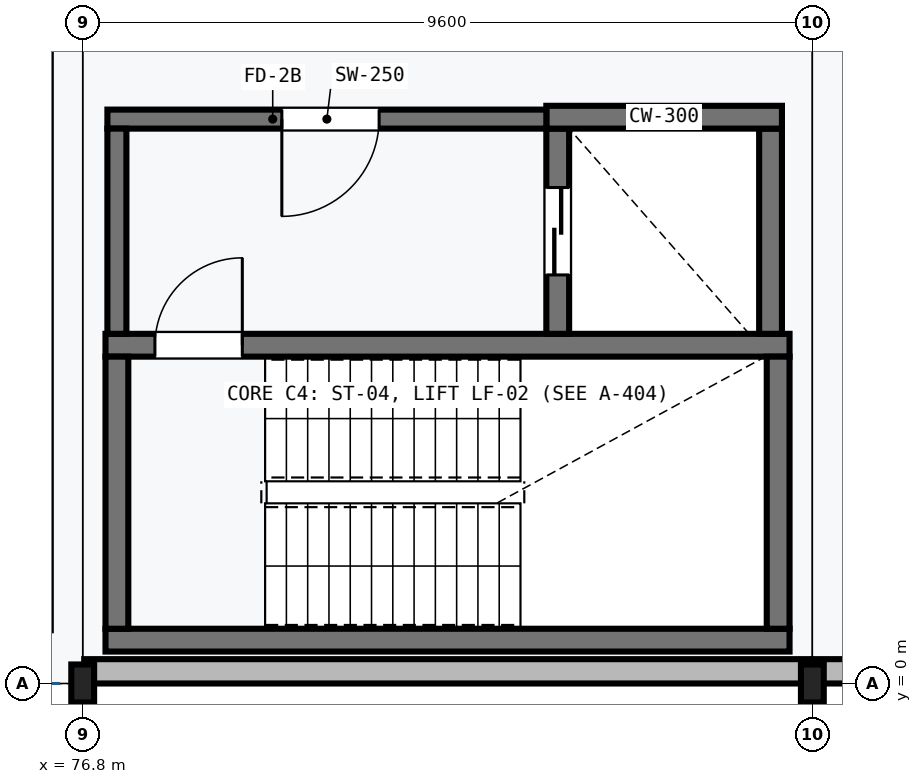
"""IFC4 building model, lengths in metres.
Left out: names, types, materials, properties, quantities, classifications, styles, units other than length and angle.
Written with IfcOpenShell. Run it as: python <this file> out.ifc"""

import sys

from ifc_helpers import new_model, si_unit, direction, frame, frame_2d, origin, origin_2d, place, context, subcontext, project, spatial, rectangle, i_section, extrude, element, fill, save


model = new_model("IFC4")
c1 = context("Model", 3, precision=1e-05, world=origin(), true_north=direction((0.0, 1.0)))
c2 = subcontext(c1, "Body", "Model", "MODEL_VIEW")
j1 = project(units=[si_unit("LENGTHUNIT", "METRE"), si_unit("PLANEANGLEUNIT", "RADIAN")], contexts=[c1])
p1 = place(None, origin())
s1 = spatial("IfcSite", under=j1, at=p1, CompositionType="ELEMENT")
p2 = place(p1, origin())
s2 = spatial("IfcBuilding", under=s1, at=p2, CompositionType="ELEMENT")
p3 = place(p2, frame((0.0, 0.0, 6.0)))
s3 = spatial("IfcBuildingStorey", under=s2, at=p3, CompositionType="ELEMENT", Elevation=6.0)
for number, where, z_axis, x_axis in (
    (1, (76.8, 0.0, 0.0), (0.0, 0.0, 1.0), (1.0, 0.0, 0.0)),
    (2, (86.4, 0.0, 0.0), (0.0, 0.0, 1.0), (1.0, 0.0, 0.0)),
):
    element("IfcColumn", number, at=place(p3, frame(where, z_axis=z_axis, x_axis=x_axis)), inside=s3, PredefinedType="COLUMN", context=c2, shape_type="SweptSolid", body=[
        extrude(i_section(OverallWidth=0.3, OverallDepth=0.5, WebThickness=0.014, FlangeThickness=0.028, FilletRadius=0.027, at=origin_2d()), origin(), (0.0, 0.0, 1.0), 4.25),
    ])
p4 = place(p3, frame((77.1, 0.57, 0.0), z_axis=(0.0, 0.0, 1.0), x_axis=(1.0, 0.0, 0.0)))
e3 = element("IfcWall", 3, at=p4, inside=s3, PredefinedType="SHEAR", context=c2, shape_type="SweptSolid", body=[
    extrude(rectangle(XDim=9.0, YDim=0.3, at=frame_2d((4.5, 0.0))), origin(), (0.0, 0.0, 1.0), 4.25),
])
p5 = place(p3, frame((86.1, 4.45, 0.0), z_axis=(0.0, 0.0, 1.0), x_axis=(-1.0, 0.0, 0.0)))
e4 = element("IfcWall", 4, at=p5, inside=s3, PredefinedType="SHEAR", context=c2, shape_type="SweptSolid", body=[
    extrude(rectangle(XDim=9.0, YDim=0.3, at=frame_2d((4.5, 0.0))), origin(), (0.0, 0.0, 1.0), 4.25),
])
p6 = place(p5, frame((7.2, 0.0, 0.0)))
e5 = element("IfcOpeningElement", 5, at=p6, cuts=e4, PredefinedType="OPENING", context=c2, shape_type="SweptSolid", body=[
    extrude(rectangle(XDim=1.15, YDim=2.15, at=frame_2d((0.575, 1.075))), frame((0.0, 0.16, 0.0), z_axis=(0.0, -1.0, 0.0), x_axis=(1.0, 0.0, 0.0)), (0.0, 0.0, 1.0), 0.32),
])
for number, where, z_axis, x_axis in (
    (6, (77.25, 0.72, 0.0), (0.0, 0.0, 1.0), (0.0, 1.0, 0.0)),
    (7, (85.95, 4.3, 0.0), (0.0, 0.0, 1.0), (0.0, -1.0, 0.0)),
):
    element("IfcWall", number, at=place(p3, frame(where, z_axis=z_axis, x_axis=x_axis)), inside=s3, PredefinedType="SHEAR", context=c2, shape_type="SweptSolid", body=[
        extrude(rectangle(XDim=3.58, YDim=0.3, at=frame_2d((1.79, 0.0))), origin(), (0.0, 0.0, 1.0), 4.25),
    ])
p7 = place(p3, frame((83.05, 7.3, 0.0), z_axis=(0.0, 0.0, 1.0), x_axis=(0.0, -1.0, 0.0)))
e8 = element("IfcWall", 8, at=p7, inside=s3, PredefinedType="SHEAR", context=c2, shape_type="SweptSolid", body=[
    extrude(rectangle(XDim=2.7, YDim=0.3, at=frame_2d((1.35, 0.0))), origin(), (0.0, 0.0, 1.0), 4.25),
])
p8 = place(p7, frame((0.775, 0.0, 0.0)))
e9 = element("IfcOpeningElement", 9, at=p8, cuts=e8, PredefinedType="OPENING", context=c2, shape_type="SweptSolid", body=[
    extrude(rectangle(XDim=1.15, YDim=2.1, at=frame_2d((0.575, 1.05))), frame((0.0, 0.16, 0.0), z_axis=(0.0, -1.0, 0.0), x_axis=(1.0, 0.0, 0.0)), (0.0, 0.0, 1.0), 0.32),
])
p9 = place(p3, frame((85.85, 4.6, 0.0), z_axis=(0.0, 0.0, 1.0), x_axis=(0.0, 1.0, 0.0)))
e10 = element("IfcWall", 10, at=p9, inside=s3, PredefinedType="SHEAR", context=c2, shape_type="SweptSolid", body=[
    extrude(rectangle(XDim=2.7, YDim=0.3, at=frame_2d((1.35, 0.0))), origin(), (0.0, 0.0, 1.0), 4.25),
])
p10 = place(p3, frame((82.9, 7.45, 0.0), z_axis=(0.0, 0.0, 1.0), x_axis=(1.0, 0.0, 0.0)))
e11 = element("IfcWall", 11, at=p10, inside=s3, PredefinedType="SHEAR", context=c2, shape_type="SweptSolid", body=[
    extrude(rectangle(XDim=3.1, YDim=0.3, at=frame_2d((1.55, 0.0))), origin(), (0.0, 0.0, 1.0), 4.25),
])
p11 = place(p3, frame((82.9, 7.425, 0.0), z_axis=(0.0, 0.0, 1.0), x_axis=(-1.0, 0.0, 0.0)))
e12 = element("IfcWall", 12, at=p11, inside=s3, PredefinedType="SHEAR", context=c2, shape_type="SweptSolid", body=[
    extrude(rectangle(XDim=5.775, YDim=0.25, at=frame_2d((2.887, 0.0))), origin(), (0.0, 0.0, 1.0), 4.25),
])
p12 = place(p11, frame((2.2, 0.0, 0.0)))
e13 = element("IfcOpeningElement", 13, at=p12, cuts=e12, PredefinedType="OPENING", context=c2, shape_type="SweptSolid", body=[
    extrude(rectangle(XDim=1.28, YDim=2.2, at=frame_2d((0.64, 1.1))), frame((0.0, 0.135, 0.0), z_axis=(0.0, -1.0, 0.0), x_axis=(1.0, 0.0, 0.0)), (0.0, 0.0, 1.0), 0.27),
])
p13 = place(p3, frame((77.25, 4.6, 0.0), z_axis=(0.0, 0.0, 1.0), x_axis=(0.0, 1.0, 0.0)))
e14 = element("IfcWall", 14, at=p13, inside=s3, PredefinedType="SHEAR", context=c2, shape_type="SweptSolid", body=[
    extrude(rectangle(XDim=2.7, YDim=0.25, at=frame_2d((1.35, 0.0))), origin(), (0.0, 0.0, 1.0), 4.25),
])
p14 = place(p3, frame((86.38, 0.16, 0.0), z_axis=(0.0, 0.0, 1.0), x_axis=(-1.0, 0.0, 0.0)))
e15 = element("IfcWall", 15, at=p14, inside=s3, PredefinedType="SOLIDWALL", context=c2, shape_type="SweptSolid", body=[
    extrude(rectangle(XDim=9.56, YDim=0.32, at=frame_2d((4.78, 0.0))), origin(), (0.0, 0.0, 1.0), 3.9),
])
p15 = place(p3, frame((95.98, 0.16, 0.0), z_axis=(0.0, 0.0, 1.0), x_axis=(-1.0, 0.0, 0.0)))
e16 = element("IfcWall", 16, at=p15, inside=s3, PredefinedType="SOLIDWALL", context=c2, shape_type="SweptSolid", body=[
    extrude(rectangle(XDim=9.56, YDim=0.32, at=frame_2d((4.78, 0.0))), origin(), (0.0, 0.0, 1.0), 3.9),
])
p16 = place(p15, frame((3.43, 0.0, 0.9)))
e17 = element("IfcOpeningElement", 17, at=p16, cuts=e16, PredefinedType="OPENING", context=c2, shape_type="SweptSolid", body=[
    extrude(rectangle(XDim=2.7, YDim=1.5, at=frame_2d((1.35, 0.75))), frame((0.0, 0.17, 0.0), z_axis=(0.0, -1.0, 0.0), x_axis=(1.0, 0.0, 0.0)), (0.0, 0.0, 1.0), 0.34),
])
p17 = place(p3, frame((76.31, 9.12, 0.0), z_axis=(0.0, 0.0, 1.0), x_axis=(0.0, -1.0, 0.0)))
e18 = element("IfcWall", 18, at=p17, inside=s3, PredefinedType="PARTITIONING", context=c2, shape_type="SweptSolid", body=[
    extrude(rectangle(XDim=8.44, YDim=0.18, at=frame_2d((4.22, 0.0))), origin(), (0.0, 0.0, 1.0), 3.89),
])
p18 = place(p6, frame((1.15, 0.0, 0.0), z_axis=(0.0, 0.0, 1.0), x_axis=(-1.0, 0.0, 0.0)))
e19 = element("IfcDoor", 19, at=p18, inside=s3, OperationType="SINGLE_SWING_LEFT", PredefinedType="DOOR", context=c2, shape_type="SweptSolid", body=[
    extrude(rectangle(XDim=1.15, YDim=2.15, at=frame_2d((0.575, 1.075))), frame((0.0, 0.025, 0.0), z_axis=(0.0, -1.0, 0.0), x_axis=(1.0, 0.0, 0.0)), (0.0, 0.0, 1.0), 0.05),
])
fill(e5, e19)
p19 = place(p8, frame((1.15, 0.0, 0.0), z_axis=(0.0, 0.0, 1.0), x_axis=(-1.0, 0.0, 0.0)))
e20 = element("IfcDoor", 20, at=p19, inside=s3, OperationType="DOUBLE_DOOR_SLIDING", PredefinedType="DOOR", context=c2, shape_type="SweptSolid", body=[
    extrude(rectangle(XDim=1.15, YDim=2.1, at=frame_2d((0.575, 1.05))), frame((0.0, 0.025, 0.0), z_axis=(0.0, -1.0, 0.0), x_axis=(1.0, 0.0, 0.0)), (0.0, 0.0, 1.0), 0.05),
])
fill(e9, e20)
p20 = place(p12, origin())
e21 = element("IfcDoor", 21, at=p20, inside=s3, OperationType="SINGLE_SWING_RIGHT", PredefinedType="DOOR", context=c2, shape_type="SweptSolid", body=[
    extrude(rectangle(XDim=1.28, YDim=2.2, at=frame_2d((0.64, 1.1))), frame((0.0, 0.025, 0.0), z_axis=(0.0, -1.0, 0.0), x_axis=(1.0, 0.0, 0.0)), (0.0, 0.0, 1.0), 0.05),
])
fill(e13, e21)
save(model, sys.argv[1])
